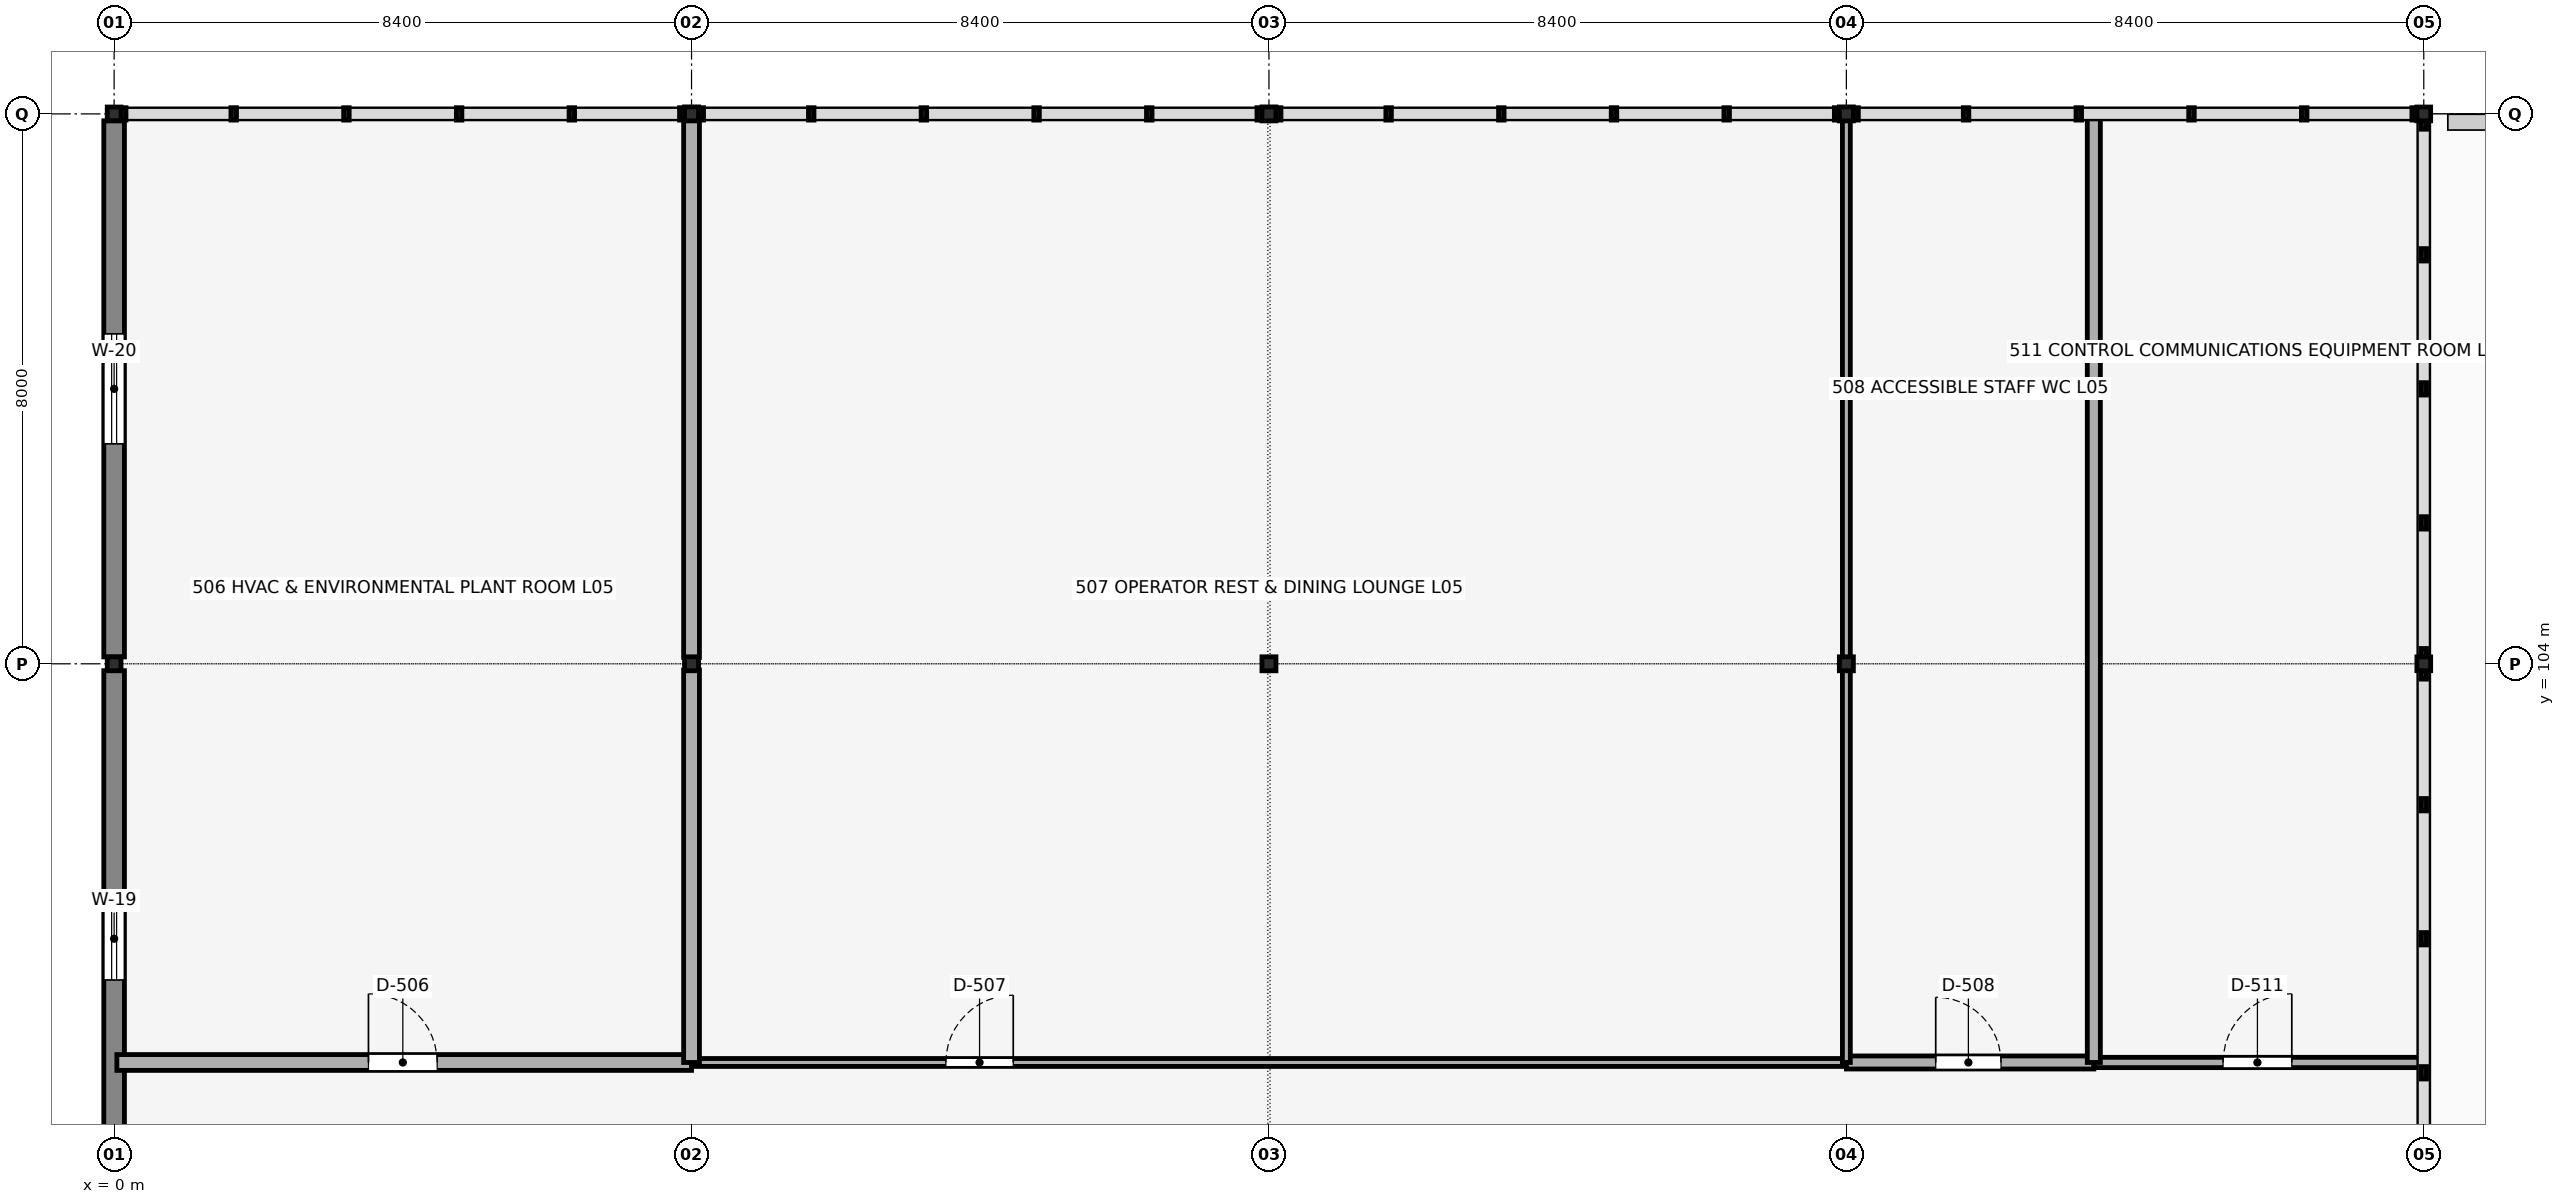
"""IFC4 building model, lengths in metres.
Left out: names, types, materials, properties, quantities, classifications, styles, units other than length and angle.
Written with IfcOpenShell. Run it as: python <this file> out.ifc"""

import sys

from ifc_helpers import new_model, si_unit, direction, frame, frame_2d, origin, origin_2d, place, context, subcontext, project, spatial, rectangle, hollow_rectangle, i_section, extrude, element, fill, save


model = new_model("IFC4")
c1 = context("Model", 3, precision=1e-05, world=origin(), true_north=direction((0.0, 1.0)))
c2 = subcontext(c1, "Body", "Model", "MODEL_VIEW")
j1 = project(units=[si_unit("LENGTHUNIT", "METRE"), si_unit("PLANEANGLEUNIT", "RADIAN")], contexts=[c1])
p1 = place(None, origin())
s1 = spatial("IfcSite", under=j1, at=p1, CompositionType="ELEMENT")
p2 = place(p1, origin())
s2 = spatial("IfcBuilding", under=s1, at=p2, CompositionType="ELEMENT")
p3 = place(p2, frame((0.0, 0.0, 21.04)))
s3 = spatial("IfcBuildingStorey", under=s2, at=p3, CompositionType="ELEMENT", Elevation=21.04)
for number, where, z_axis, x_axis in (
    (1, (0.0, 104.0, 0.0), (0.0, 0.0, 1.0), (1.0, 0.0, 0.0)),
    (2, (0.0, 112.0, 0.0), (0.0, 0.0, 1.0), (1.0, 0.0, 0.0)),
):
    element("IfcColumn", number, at=place(p3, frame(where, z_axis=z_axis, x_axis=x_axis)), inside=s3, PredefinedType="COLUMN", context=c2, shape_type="SweptSolid", body=[
        extrude(hollow_rectangle(XDim=0.2, YDim=0.2, WallThickness=0.01, InnerFilletRadius=0.015, OuterFilletRadius=0.025, at=origin_2d()), origin(), (0.0, 0.0, 1.0), 3.92),
    ])
for number, where, z_axis, x_axis in (
    (3, (8.4, 104.0, 0.0), (0.0, 0.0, 1.0), (1.0, 0.0, 0.0)),
    (4, (8.4, 112.0, 0.0), (0.0, 0.0, 1.0), (1.0, 0.0, 0.0)),
):
    element("IfcColumn", number, at=place(p3, frame(where, z_axis=z_axis, x_axis=x_axis)), inside=s3, PredefinedType="COLUMN", context=c2, shape_type="SweptSolid", body=[
        extrude(i_section(OverallWidth=0.204, OverallDepth=0.203, WebThickness=0.007, FlangeThickness=0.011, FilletRadius=0.01, at=origin_2d()), origin(), (0.0, 0.0, 1.0), 4.82),
    ])
for number, where, z_axis, x_axis in (
    (5, (16.8, 104.0, 0.0), (0.0, 0.0, 1.0), (1.0, 0.0, 0.0)),
    (6, (16.8, 112.0, 0.0), (0.0, 0.0, 1.0), (1.0, 0.0, 0.0)),
):
    element("IfcColumn", number, at=place(p3, frame(where, z_axis=z_axis, x_axis=x_axis)), inside=s3, PredefinedType="COLUMN", context=c2, shape_type="SweptSolid", body=[
        extrude(i_section(OverallWidth=0.204, OverallDepth=0.203, WebThickness=0.007, FlangeThickness=0.011, FilletRadius=0.01, at=origin_2d()), origin(), (0.0, 0.0, 1.0), 5.72),
    ])
for number, where, z_axis, x_axis in (
    (7, (25.2, 104.0, 0.0), (0.0, 0.0, 1.0), (1.0, 0.0, 0.0)),
    (8, (25.2, 112.0, 0.0), (0.0, 0.0, 1.0), (1.0, 0.0, 0.0)),
):
    element("IfcColumn", number, at=place(p3, frame(where, z_axis=z_axis, x_axis=x_axis)), inside=s3, PredefinedType="COLUMN", context=c2, shape_type="SweptSolid", body=[
        extrude(i_section(OverallWidth=0.204, OverallDepth=0.203, WebThickness=0.007, FlangeThickness=0.011, FilletRadius=0.01, at=origin_2d()), origin(), (0.0, 0.0, 1.0), 4.82),
    ])
for number, where, z_axis, x_axis in (
    (9, (33.6, 104.0, 0.0), (0.0, 0.0, 1.0), (1.0, 0.0, 0.0)),
    (10, (33.6, 112.0, 0.0), (0.0, 0.0, 1.0), (1.0, 0.0, 0.0)),
):
    element("IfcColumn", number, at=place(p3, frame(where, z_axis=z_axis, x_axis=x_axis)), inside=s3, PredefinedType="COLUMN", context=c2, shape_type="SweptSolid", body=[
        extrude(hollow_rectangle(XDim=0.2, YDim=0.2, WallThickness=0.01, InnerFilletRadius=0.015, OuterFilletRadius=0.025, at=origin_2d()), origin(), (0.0, 0.0, 1.0), 3.92),
    ])
p4 = place(p3, frame((0.0, 96.1, 0.0), z_axis=(0.0, 0.0, 1.0), x_axis=(0.0, 1.0, 0.0)))
e11 = element("IfcWall", 11, at=p4, inside=s3, PredefinedType="SOLIDWALL", context=c2, shape_type="SweptSolid", body=[
    extrude(rectangle(XDim=7.8, YDim=0.3, at=frame_2d((3.9, 0.0))), origin(), (0.0, 0.0, 1.0), 3.62),
])
p5 = place(p4, frame((3.3, 0.0, 1.55), z_axis=(0.0, 0.0, 1.0), x_axis=(1.0, 0.0, 0.0)))
e12 = element("IfcOpeningElement", 12, at=p5, cuts=e11, PredefinedType="OPENING", context=c2, shape_type="SweptSolid", body=[
    extrude(rectangle(XDim=1.2, YDim=0.95, at=frame_2d((0.6, 0.475))), frame((0.0, 0.16, 0.0), z_axis=(0.0, -1.0, 0.0), x_axis=(1.0, 0.0, 0.0)), (0.0, 0.0, 1.0), 0.32),
])
p6 = place(p3, frame((0.0, 104.1, 0.0), z_axis=(0.0, 0.0, 1.0), x_axis=(0.0, 1.0, 0.0)))
e13 = element("IfcWall", 13, at=p6, inside=s3, PredefinedType="SOLIDWALL", context=c2, shape_type="SweptSolid", body=[
    extrude(rectangle(XDim=7.8, YDim=0.3, at=frame_2d((3.9, 0.0))), origin(), (0.0, 0.0, 1.0), 3.62),
])
p7 = place(p6, frame((3.1, 0.0, 0.9), z_axis=(0.0, 0.0, 1.0), x_axis=(1.0, 0.0, 0.0)))
e14 = element("IfcOpeningElement", 14, at=p7, cuts=e13, PredefinedType="OPENING", context=c2, shape_type="SweptSolid", body=[
    extrude(rectangle(XDim=1.6, YDim=1.2, at=frame_2d((0.8, 0.6))), frame((0.0, 0.16, 0.0), z_axis=(0.0, -1.0, 0.0), x_axis=(1.0, 0.0, 0.0)), (0.0, 0.0, 1.0), 0.32),
])
p8 = place(p3, frame((33.95, 111.88, 0.0), z_axis=(0.0, 0.0, 1.0), x_axis=(1.0, 0.0, 0.0)))
e15 = element("IfcWall", 15, at=p8, inside=s3, PredefinedType="PARAPET", context=c2, shape_type="SweptSolid", body=[
    extrude(rectangle(XDim=16.33, YDim=0.23, at=frame_2d((8.165, 0.0))), origin(), (0.0, 0.0, 1.0), 1.05),
])
p9 = place(p3, frame((0.04, 98.2, 0.0), z_axis=(0.0, 0.0, 1.0), x_axis=(1.0, 0.0, 0.0)))
e16 = element("IfcWall", 16, at=p9, inside=s3, PredefinedType="PARTITIONING", context=c2, shape_type="SweptSolid", body=[
    extrude(rectangle(XDim=8.36, YDim=0.23, at=frame_2d((4.18, 0.0))), origin(), (0.0, 0.0, 1.0), 3.92),
])
p10 = place(p9, frame((3.66, 0.0, 0.0), z_axis=(0.0, 0.0, 1.0), x_axis=(1.0, 0.0, 0.0)))
e17 = element("IfcOpeningElement", 17, at=p10, cuts=e16, PredefinedType="OPENING", context=c2, shape_type="SweptSolid", body=[
    extrude(rectangle(XDim=1.0, YDim=2.15, at=frame_2d((0.5, 1.075))), frame((0.0, 0.125, 0.0), z_axis=(0.0, -1.0, 0.0), x_axis=(1.0, 0.0, 0.0)), (0.0, 0.0, 1.0), 0.25),
])
p11 = place(p3, frame((8.4, 98.2, 0.0), z_axis=(0.0, 0.0, 1.0), x_axis=(1.0, 0.0, 0.0)))
e18 = element("IfcWall", 18, at=p11, inside=s3, PredefinedType="PARTITIONING", context=c2, shape_type="SweptSolid", body=[
    extrude(rectangle(XDim=16.8, YDim=0.115, at=frame_2d((8.4, 0.0))), origin(), (0.0, 0.0, 1.0), 3.92),
])
p12 = place(p11, frame((3.7, 0.0, 0.0), z_axis=(0.0, 0.0, 1.0), x_axis=(1.0, 0.0, 0.0)))
e19 = element("IfcOpeningElement", 19, at=p12, cuts=e18, PredefinedType="OPENING", context=c2, shape_type="SweptSolid", body=[
    extrude(rectangle(XDim=0.98, YDim=2.15, at=frame_2d((0.49, 1.075))), frame((0.0, 0.067, 0.0), z_axis=(0.0, -1.0, 0.0), x_axis=(1.0, 0.0, 0.0)), (0.0, 0.0, 1.0), 0.135),
])
p13 = place(p3, frame((25.2, 98.2, 0.0), z_axis=(0.0, 0.0, 1.0), x_axis=(1.0, 0.0, 0.0)))
e20 = element("IfcWall", 20, at=p13, inside=s3, PredefinedType="PLUMBINGWALL", context=c2, shape_type="SweptSolid", body=[
    extrude(rectangle(XDim=3.6, YDim=0.19, at=frame_2d((1.8, 0.0))), origin(), (0.0, 0.0, 1.0), 3.92),
])
p14 = place(p13, frame((1.3, 0.0, 0.0), z_axis=(0.0, 0.0, 1.0), x_axis=(1.0, 0.0, 0.0)))
e21 = element("IfcOpeningElement", 21, at=p14, cuts=e20, PredefinedType="OPENING", context=c2, shape_type="SweptSolid", body=[
    extrude(rectangle(XDim=0.95, YDim=2.15, at=frame_2d((0.475, 1.075))), frame((0.0, 0.105, 0.0), z_axis=(0.0, -1.0, 0.0), x_axis=(1.0, 0.0, 0.0)), (0.0, 0.0, 1.0), 0.21),
])
p15 = place(p3, frame((28.8, 98.2, 0.0), z_axis=(0.0, 0.0, 1.0), x_axis=(1.0, 0.0, 0.0)))
e22 = element("IfcWall", 22, at=p15, inside=s3, PredefinedType="PARTITIONING", context=c2, shape_type="SweptSolid", body=[
    extrude(rectangle(XDim=4.76, YDim=0.15, at=frame_2d((2.38, 0.0))), origin(), (0.0, 0.0, 1.0), 3.92),
])
p16 = place(p15, frame((1.88, 0.0, 0.0), z_axis=(0.0, 0.0, 1.0), x_axis=(1.0, 0.0, 0.0)))
e23 = element("IfcOpeningElement", 23, at=p16, cuts=e22, PredefinedType="OPENING", context=c2, shape_type="SweptSolid", body=[
    extrude(rectangle(XDim=1.0, YDim=2.15, at=frame_2d((0.5, 1.075))), frame((0.0, 0.085, 0.0), z_axis=(0.0, -1.0, 0.0), x_axis=(1.0, 0.0, 0.0)), (0.0, 0.0, 1.0), 0.17),
])
p17 = place(p3, frame((8.4, 98.2, 0.0), z_axis=(0.0, 0.0, 1.0), x_axis=(0.0, 1.0, 0.0)))
e24 = element("IfcWall", 24, at=p17, inside=s3, PredefinedType="PARTITIONING", context=c2, shape_type="SweptSolid", body=[
    extrude(rectangle(XDim=5.708, YDim=0.23, at=frame_2d((2.854, 0.0))), origin(), (0.0, 0.0, 1.0), 3.92),
])
p18 = place(p3, frame((8.4, 104.092, 0.0), z_axis=(0.0, 0.0, 1.0), x_axis=(0.0, 1.0, 0.0)))
e25 = element("IfcWall", 25, at=p18, inside=s3, PredefinedType="PARTITIONING", context=c2, shape_type="SweptSolid", body=[
    extrude(rectangle(XDim=7.817, YDim=0.23, at=frame_2d((3.908, 0.0))), origin(), (0.0, 0.0, 1.0), 3.92),
])
p19 = place(p3, frame((25.2, 98.2, 0.0), z_axis=(0.0, 0.0, 1.0), x_axis=(0.0, 1.0, 0.0)))
e26 = element("IfcWall", 26, at=p19, inside=s3, PredefinedType="PARTITIONING", context=c2, shape_type="SweptSolid", body=[
    extrude(rectangle(XDim=5.708, YDim=0.115, at=frame_2d((2.854, 0.0))), origin(), (0.0, 0.0, 1.0), 3.92),
])
p20 = place(p3, frame((25.2, 104.092, 0.0), z_axis=(0.0, 0.0, 1.0), x_axis=(0.0, 1.0, 0.0)))
e27 = element("IfcWall", 27, at=p20, inside=s3, PredefinedType="PARTITIONING", context=c2, shape_type="SweptSolid", body=[
    extrude(rectangle(XDim=7.817, YDim=0.115, at=frame_2d((3.908, 0.0))), origin(), (0.0, 0.0, 1.0), 3.92),
])
p21 = place(p3, frame((28.8, 98.2, 0.0), z_axis=(0.0, 0.0, 1.0), x_axis=(0.0, 1.0, 0.0)))
e28 = element("IfcWall", 28, at=p21, inside=s3, PredefinedType="PLUMBINGWALL", context=c2, shape_type="SweptSolid", body=[
    extrude(rectangle(XDim=13.76, YDim=0.19, at=frame_2d((6.88, 0.0))), origin(), (0.0, 0.0, 1.0), 3.92),
])
p22 = place(p5, origin())
e29 = element("IfcWindow", 29, at=p22, inside=s3, PartitioningType="SINGLE_PANEL", PredefinedType="WINDOW", context=c2, shape_type="SweptSolid", body=[
    extrude(rectangle(XDim=1.2, YDim=0.95, at=frame_2d((0.6, 0.475))), frame((0.0, 0.03, 0.0), z_axis=(0.0, -1.0, 0.0), x_axis=(1.0, 0.0, 0.0)), (0.0, 0.0, 1.0), 0.06),
])
fill(e12, e29)
p23 = place(p7, origin())
e30 = element("IfcWindow", 30, at=p23, inside=s3, PartitioningType="DOUBLE_PANEL_VERTICAL", PredefinedType="WINDOW", context=c2, shape_type="SweptSolid", body=[
    extrude(rectangle(XDim=1.6, YDim=1.2, at=frame_2d((0.8, 0.6))), frame((0.0, 0.03, 0.0), z_axis=(0.0, -1.0, 0.0), x_axis=(1.0, 0.0, 0.0)), (0.0, 0.0, 1.0), 0.06),
])
fill(e14, e30)
p24 = place(p10, origin())
e31 = element("IfcDoor", 31, at=p24, inside=s3, OperationType="SINGLE_SWING_LEFT", PredefinedType="DOOR", context=c2, shape_type="SweptSolid", body=[
    extrude(rectangle(XDim=1.0, YDim=2.15, at=frame_2d((0.5, 1.075))), frame((0.0, 0.025, 0.0), z_axis=(0.0, -1.0, 0.0), x_axis=(1.0, 0.0, 0.0)), (0.0, 0.0, 1.0), 0.05),
])
fill(e17, e31)
p25 = place(p12, origin())
e32 = element("IfcDoor", 32, at=p25, inside=s3, OperationType="SINGLE_SWING_RIGHT", PredefinedType="DOOR", context=c2, shape_type="SweptSolid", body=[
    extrude(rectangle(XDim=0.98, YDim=2.15, at=frame_2d((0.49, 1.075))), frame((0.0, 0.025, 0.0), z_axis=(0.0, -1.0, 0.0), x_axis=(1.0, 0.0, 0.0)), (0.0, 0.0, 1.0), 0.05),
])
fill(e19, e32)
p26 = place(p14, origin())
e33 = element("IfcDoor", 33, at=p26, inside=s3, OperationType="SINGLE_SWING_LEFT", PredefinedType="DOOR", context=c2, shape_type="SweptSolid", body=[
    extrude(rectangle(XDim=0.95, YDim=2.15, at=frame_2d((0.475, 1.075))), frame((0.0, 0.025, 0.0), z_axis=(0.0, -1.0, 0.0), x_axis=(1.0, 0.0, 0.0)), (0.0, 0.0, 1.0), 0.05),
])
fill(e21, e33)
p27 = place(p16, origin())
e34 = element("IfcDoor", 34, at=p27, inside=s3, OperationType="SINGLE_SWING_RIGHT", PredefinedType="DOOR", context=c2, shape_type="SweptSolid", body=[
    extrude(rectangle(XDim=1.0, YDim=2.15, at=frame_2d((0.5, 1.075))), frame((0.0, 0.025, 0.0), z_axis=(0.0, -1.0, 0.0), x_axis=(1.0, 0.0, 0.0)), (0.0, 0.0, 1.0), 0.05),
])
fill(e23, e34)
save(model, sys.argv[1])
